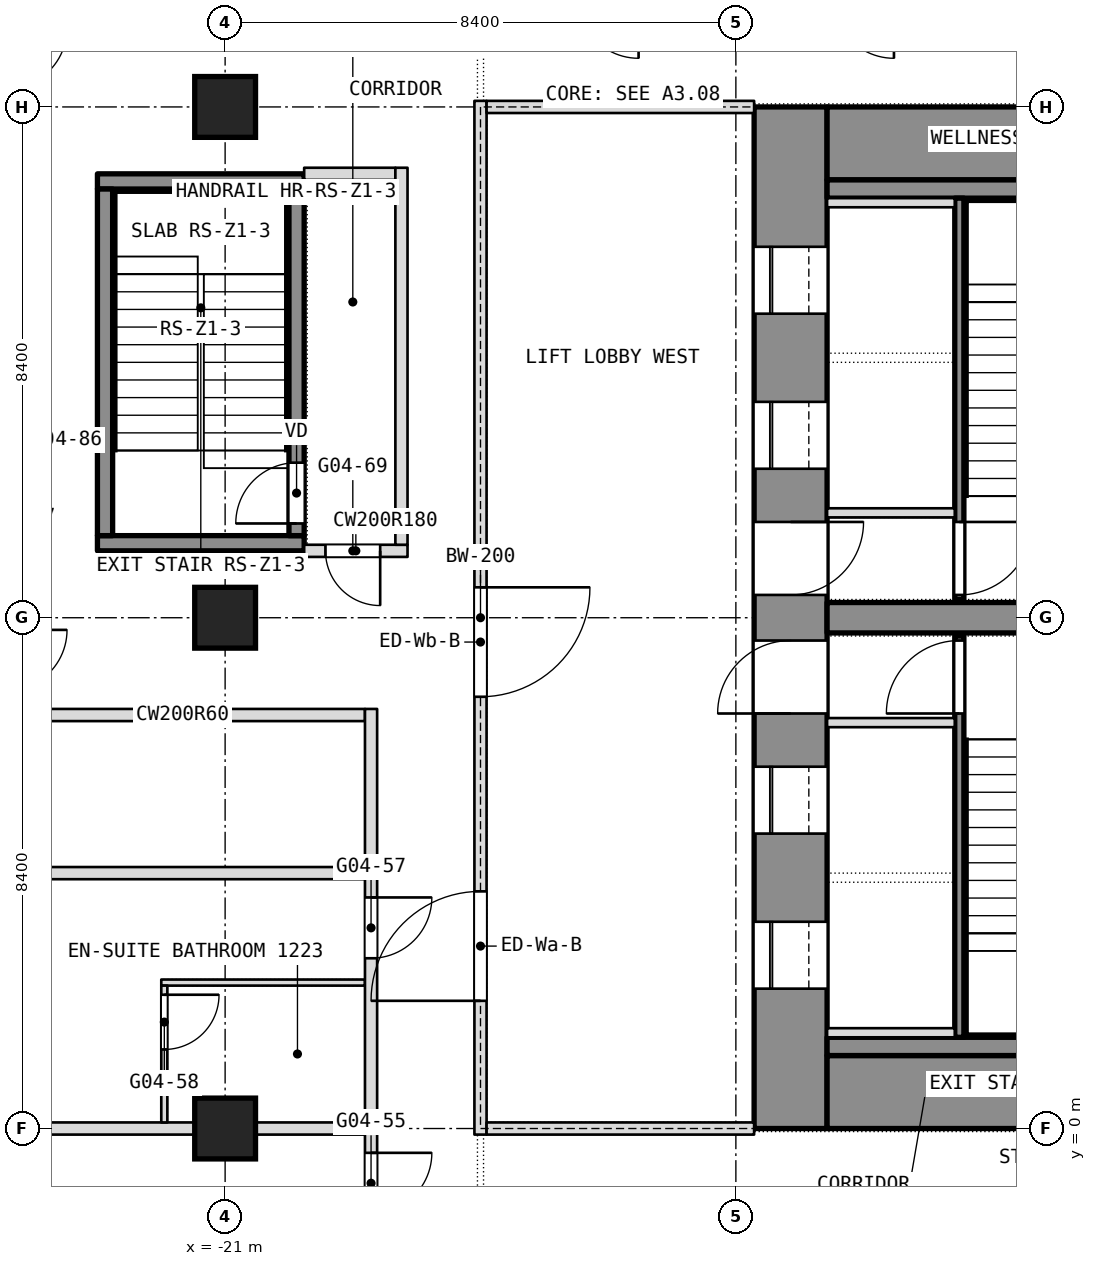
"""IFC4 building model, lengths in metres.
Left out: names, types, materials, properties, quantities, classifications, styles, units other than length and angle.
Written with IfcOpenShell. Run it as: python <this file> out.ifc"""

import sys

from ifc_helpers import new_model, si_unit, direction, frame, frame_2d, origin, origin_2d, place, context, subcontext, project, spatial, rectangle, extrude, element, fill, save


model = new_model("IFC4")
c1 = context("Model", 3, precision=1e-05, world=origin(), true_north=direction((0.0, 1.0)))
c2 = subcontext(c1, "Body", "Model", "MODEL_VIEW")
j1 = project(units=[si_unit("LENGTHUNIT", "METRE"), si_unit("PLANEANGLEUNIT", "RADIAN")], contexts=[c1])
p1 = place(None, origin())
s1 = spatial("IfcSite", under=j1, at=p1, CompositionType="ELEMENT")
p2 = place(p1, origin())
s2 = spatial("IfcBuilding", under=s1, at=p2, CompositionType="ELEMENT")
p3 = place(p2, frame((0.0, 0.0, 58.1)))
s3 = spatial("IfcBuildingStorey", under=s2, at=p3, CompositionType="ELEMENT", Elevation=58.1)
p4 = place(p3, frame((-11.7, 0.0, 0.0), z_axis=(0.0, 0.0, 1.0), x_axis=(0.0, 1.0, 0.0)))
e1 = element("IfcWall", 1, at=p4, inside=s3, PredefinedType="SHEAR", context=c2, shape_type="SweptSolid", body=[
    extrude(rectangle(XDim=16.8, YDim=1.2, at=frame_2d((8.4, 0.0))), origin(), (0.0, 0.0, 1.0), 3.6),
])
p5 = place(p4, frame((2.3, 0.0, 0.0)))
e2 = element("IfcOpeningElement", 2, at=p5, cuts=e1, PredefinedType="OPENING", context=c2, shape_type="SweptSolid", body=[
    extrude(rectangle(XDim=1.1, YDim=2.1, at=frame_2d((0.55, 1.05))), frame((0.0, 0.6, 0.0), z_axis=(0.0, -1.0, 0.0), x_axis=(1.0, 0.0, 0.0)), (0.0, 0.0, 1.0), 1.2),
])
p6 = place(p4, frame((4.85, 0.0, 0.0)))
e3 = element("IfcOpeningElement", 3, at=p6, cuts=e1, PredefinedType="OPENING", context=c2, shape_type="SweptSolid", body=[
    extrude(rectangle(XDim=1.1, YDim=2.1, at=frame_2d((0.55, 1.05))), frame((0.0, 0.6, 0.0), z_axis=(0.0, -1.0, 0.0), x_axis=(1.0, 0.0, 0.0)), (0.0, 0.0, 1.0), 1.2),
])
p7 = place(p4, frame((6.825, 0.0, 0.0)))
e4 = element("IfcOpeningElement", 4, at=p7, cuts=e1, PredefinedType="OPENING", context=c2, shape_type="SweptSolid", body=[
    extrude(rectangle(XDim=1.2, YDim=2.1, at=frame_2d((0.6, 1.05))), frame((0.0, 0.6, 0.0), z_axis=(0.0, -1.0, 0.0), x_axis=(1.0, 0.0, 0.0)), (0.0, 0.0, 1.0), 1.2),
])
p8 = place(p4, frame((13.4, 0.0, 0.0)))
e5 = element("IfcOpeningElement", 5, at=p8, cuts=e1, PredefinedType="OPENING", context=c2, shape_type="SweptSolid", body=[
    extrude(rectangle(XDim=1.1, YDim=2.1, at=frame_2d((0.55, 1.05))), frame((0.0, 0.6, 0.0), z_axis=(0.0, -1.0, 0.0), x_axis=(1.0, 0.0, 0.0)), (0.0, 0.0, 1.0), 1.2),
])
p9 = place(p4, frame((10.85, 0.0, 0.0)))
e6 = element("IfcOpeningElement", 6, at=p9, cuts=e1, PredefinedType="OPENING", context=c2, shape_type="SweptSolid", body=[
    extrude(rectangle(XDim=1.1, YDim=2.1, at=frame_2d((0.55, 1.05))), frame((0.0, 0.6, 0.0), z_axis=(0.0, -1.0, 0.0), x_axis=(1.0, 0.0, 0.0)), (0.0, 0.0, 1.0), 1.2),
])
p10 = place(p4, frame((8.775, 0.0, 0.0)))
e7 = element("IfcOpeningElement", 7, at=p10, cuts=e1, PredefinedType="OPENING", context=c2, shape_type="SweptSolid", body=[
    extrude(rectangle(XDim=1.2, YDim=2.1, at=frame_2d((0.6, 1.05))), frame((0.0, 0.6, 0.0), z_axis=(0.0, -1.0, 0.0), x_axis=(1.0, 0.0, 0.0)), (0.0, 0.0, 1.0), 1.2),
])
for number, where, z_axis, x_axis in (
    (8, (-11.1, 0.6, 0.0), (0.0, 0.0, 1.0), (1.0, 0.0, 0.0)),
    (9, (-11.1, 16.2, 0.0), (0.0, 0.0, 1.0), (1.0, 0.0, 0.0)),
):
    element("IfcWall", number, at=place(p3, frame(where, z_axis=z_axis, x_axis=x_axis)), inside=s3, PredefinedType="SHEAR", context=c2, shape_type="SweptSolid", body=[
        extrude(rectangle(XDim=22.2, YDim=1.2, at=frame_2d((11.1, 0.0))), origin(), (0.0, 0.0, 1.0), 3.6),
    ])
p11 = place(p3, frame((-11.1, 8.4, 0.0), z_axis=(0.0, 0.0, 1.0), x_axis=(1.0, 0.0, 0.0)))
e10 = element("IfcWall", 10, at=p11, inside=s3, PredefinedType="SHEAR", context=c2, shape_type="SweptSolid", body=[
    extrude(rectangle(XDim=6.65, YDim=0.5, at=frame_2d((3.325, 0.0))), origin(), (0.0, 0.0, 1.0), 3.6),
])
for number, where, z_axis, x_axis in (
    (11, (-21.0, 0.0, 0.0), (0.0, 0.0, 1.0), (1.0, 0.0, 0.0)),
    (12, (-21.0, 8.4, 0.0), (0.0, 0.0, 1.0), (1.0, 0.0, 0.0)),
    (13, (-21.0, 16.8, 0.0), (0.0, 0.0, 1.0), (1.0, 0.0, 0.0)),
):
    element("IfcColumn", number, at=place(p3, frame(where, z_axis=z_axis, x_axis=x_axis)), inside=s3, PredefinedType="COLUMN", context=c2, shape_type="SweptSolid", body=[
        extrude(rectangle(XDim=1.0, YDim=1.0, at=origin_2d()), origin(), (0.0, 0.0, 1.0), 3.6),
    ])
p12 = place(p3, frame((-29.7, 0.0, 0.0), z_axis=(0.0, 0.0, 1.0), x_axis=(1.0, 0.0, 0.0)))
e14 = element("IfcWall", 14, at=p12, inside=s3, PredefinedType="PARTITIONING", context=c2, shape_type="SweptSolid", body=[
    extrude(rectangle(XDim=11.0, YDim=0.2, at=frame_2d((5.5, 0.0))), origin(), (0.0, 0.0, 1.0), 2.84),
])
p13 = place(p3, frame((-22.05, 2.4, 0.0), z_axis=(0.0, 0.0, 1.0), x_axis=(1.0, 0.0, 0.0)))
e15 = element("IfcWall", 15, at=p13, inside=s3, PredefinedType="PARTITIONING", context=c2, shape_type="SweptSolid", body=[
    extrude(rectangle(XDim=3.35, YDim=0.1, at=frame_2d((1.675, 0.0))), origin(), (0.0, 0.0, 1.0), 3.34),
])
p14 = place(p3, frame((-29.7, 4.2, 0.0), z_axis=(0.0, 0.0, 1.0), x_axis=(1.0, 0.0, 0.0)))
e16 = element("IfcWall", 16, at=p14, inside=s3, PredefinedType="PARTITIONING", context=c2, shape_type="SweptSolid", body=[
    extrude(rectangle(XDim=11.0, YDim=0.2, at=frame_2d((5.5, 0.0))), origin(), (0.0, 0.0, 1.0), 3.34),
])
p15 = place(p3, frame((-24.7, 6.8, 0.0), z_axis=(0.0, 0.0, 1.0), x_axis=(1.0, 0.0, 0.0)))
e17 = element("IfcWall", 17, at=p15, inside=s3, PredefinedType="PARTITIONING", context=c2, shape_type="SweptSolid", body=[
    extrude(rectangle(XDim=6.0, YDim=0.2, at=frame_2d((3.0, 0.0))), origin(), (0.0, 0.0, 1.0), 3.34),
])
p16 = place(p3, frame((-19.7, 9.5, 0.0), z_axis=(0.0, 0.0, 1.0), x_axis=(1.0, 0.0, 0.0)))
e18 = element("IfcWall", 18, at=p16, inside=s3, PredefinedType="PARTITIONING", context=c2, shape_type="SweptSolid", body=[
    extrude(rectangle(XDim=1.7, YDim=0.2, at=frame_2d((0.85, 0.0))), origin(), (0.0, 0.0, 1.0), 3.34),
])
p17 = place(p16, frame((0.35, 0.0, 0.0)))
e19 = element("IfcOpeningElement", 19, at=p17, cuts=e18, PredefinedType="OPENING", context=c2, shape_type="SweptSolid", body=[
    extrude(rectangle(XDim=0.9, YDim=2.1, at=frame_2d((0.45, 1.05))), frame((0.0, 0.1, 0.0), z_axis=(0.0, -1.0, 0.0), x_axis=(1.0, 0.0, 0.0)), (0.0, 0.0, 1.0), 0.2),
])
p18 = place(p3, frame((-19.7, 15.7, 0.0), z_axis=(0.0, 0.0, 1.0), x_axis=(1.0, 0.0, 0.0)))
e20 = element("IfcWall", 20, at=p18, inside=s3, PredefinedType="PARTITIONING", context=c2, shape_type="SweptSolid", body=[
    extrude(rectangle(XDim=1.5, YDim=0.2, at=frame_2d((0.75, 0.0))), origin(), (0.0, 0.0, 1.0), 3.34),
])
p19 = place(p3, frame((-18.1, 9.6, 0.0), z_axis=(0.0, 0.0, 1.0), x_axis=(0.0, 1.0, 0.0)))
e21 = element("IfcWall", 21, at=p19, inside=s3, PredefinedType="PARTITIONING", context=c2, shape_type="SweptSolid", body=[
    extrude(rectangle(XDim=6.2, YDim=0.2, at=frame_2d((3.1, 0.0))), origin(), (0.0, 0.0, 1.0), 3.34),
])
p20 = place(p3, frame((-18.6, -16.665, 0.0), z_axis=(0.0, 0.0, 1.0), x_axis=(0.0, 1.0, 0.0)))
e22 = element("IfcWall", 22, at=p20, inside=s3, PredefinedType="PARTITIONING", context=c2, shape_type="SweptSolid", body=[
    extrude(rectangle(XDim=23.565, YDim=0.2, at=frame_2d((11.782, 0.0))), origin(), (0.0, 0.0, 1.0), 3.34),
])
p21 = place(p20, frame((5.724, 0.0, 0.0)))
e23 = element("IfcOpeningElement", 23, at=p21, cuts=e22, PredefinedType="OPENING", context=c2, shape_type="SweptSolid", body=[
    extrude(rectangle(XDim=1.1, YDim=2.1, at=frame_2d((0.55, 1.05))), frame((0.0, 0.1, 0.0), z_axis=(0.0, -1.0, 0.0), x_axis=(1.0, 0.0, 0.0)), (0.0, 0.0, 1.0), 0.2),
])
p22 = place(p20, frame((8.665, 0.0, 0.0)))
e24 = element("IfcOpeningElement", 24, at=p22, cuts=e22, PredefinedType="OPENING", context=c2, shape_type="SweptSolid", body=[
    extrude(rectangle(XDim=1.0, YDim=2.1, at=frame_2d((0.5, 1.05))), frame((0.0, 0.1, 0.0), z_axis=(0.0, -1.0, 0.0), x_axis=(1.0, 0.0, 0.0)), (0.0, 0.0, 1.0), 0.2),
])
p23 = place(p20, frame((15.265, 0.0, 0.0)))
e25 = element("IfcOpeningElement", 25, at=p23, cuts=e22, PredefinedType="OPENING", context=c2, shape_type="SweptSolid", body=[
    extrude(rectangle(XDim=1.0, YDim=2.1, at=frame_2d((0.5, 1.05))), frame((0.0, 0.1, 0.0), z_axis=(0.0, -1.0, 0.0), x_axis=(1.0, 0.0, 0.0)), (0.0, 0.0, 1.0), 0.2),
])
p24 = place(p20, frame((19.465, 0.0, 0.0)))
e26 = element("IfcOpeningElement", 26, at=p24, cuts=e22, PredefinedType="OPENING", context=c2, shape_type="SweptSolid", body=[
    extrude(rectangle(XDim=1.0, YDim=2.1, at=frame_2d((0.5, 1.05))), frame((0.0, 0.1, 0.0), z_axis=(0.0, -1.0, 0.0), x_axis=(1.0, 0.0, 0.0)), (0.0, 0.0, 1.0), 0.2),
])
p25 = place(p3, frame((-22.0, 0.1, 0.0), z_axis=(0.0, 0.0, 1.0), x_axis=(0.0, 1.0, 0.0)))
e27 = element("IfcWall", 27, at=p25, inside=s3, PredefinedType="PARTITIONING", context=c2, shape_type="SweptSolid", body=[
    extrude(rectangle(XDim=2.25, YDim=0.1, at=frame_2d((1.125, 0.0))), origin(), (0.0, 0.0, 1.0), 3.34),
])
p26 = place(p25, frame((1.2, 0.0, 0.0)))
e28 = element("IfcOpeningElement", 28, at=p26, cuts=e27, PredefinedType="OPENING", context=c2, shape_type="SweptSolid", body=[
    extrude(rectangle(XDim=0.9, YDim=2.1, at=frame_2d((0.45, 1.05))), frame((0.0, 0.05, 0.0), z_axis=(0.0, -1.0, 0.0), x_axis=(1.0, 0.0, 0.0)), (0.0, 0.0, 1.0), 0.1),
])
for number, where, z_axis, x_axis in (
    (29, (-11.1, 1.35, 0.0), (0.0, 0.0, 1.0), (1.0, 0.0, 0.0)),
    (30, (-11.1, 15.45, 0.0), (0.0, 0.0, 1.0), (1.0, 0.0, 0.0)),
):
    element("IfcWall", number, at=place(p3, frame(where, z_axis=z_axis, x_axis=x_axis)), inside=s3, PredefinedType="PARTITIONING", context=c2, shape_type="SweptSolid", body=[
        extrude(rectangle(XDim=22.2, YDim=0.3, at=frame_2d((11.1, 0.0))), origin(), (0.0, 0.0, 1.0), 3.34),
    ])
p27 = place(p3, frame((-8.925, 1.5, 0.0), z_axis=(0.0, 0.0, 1.0), x_axis=(0.0, 1.0, 0.0)))
e31 = element("IfcWall", 31, at=p27, inside=s3, PredefinedType="SHEAR", context=c2, shape_type="SweptSolid", body=[
    extrude(rectangle(XDim=6.6, YDim=0.15, at=frame_2d((3.3, 0.0))), origin(), (0.0, 0.0, 1.0), 3.34),
])
p28 = place(p27, frame((5.325, 0.0, 0.0)))
e32 = element("IfcOpeningElement", 32, at=p28, cuts=e31, PredefinedType="OPENING", context=c2, shape_type="SweptSolid", body=[
    extrude(rectangle(XDim=1.2, YDim=2.1, at=frame_2d((0.6, 1.05))), frame((0.0, 0.075, 0.0), z_axis=(0.0, -1.0, 0.0), x_axis=(1.0, 0.0, 0.0)), (0.0, 0.0, 1.0), 0.15),
])
for number, where, z_axis, x_axis in (
    (33, (-11.1, 6.675, 0.0), (0.0, 0.0, 1.0), (1.0, 0.0, 0.0)),
    (34, (-11.1, 1.575, 0.0), (0.0, 0.0, 1.0), (1.0, 0.0, 0.0)),
):
    element("IfcWall", number, at=place(p3, frame(where, z_axis=z_axis, x_axis=x_axis)), inside=s3, PredefinedType="SHEAR", context=c2, shape_type="SweptSolid", body=[
        extrude(rectangle(XDim=2.1, YDim=0.15, at=frame_2d((1.05, 0.0))), origin(), (0.0, 0.0, 1.0), 3.6),
    ])
p29 = place(p3, frame((-8.925, 8.7, 0.0), z_axis=(0.0, 0.0, 1.0), x_axis=(0.0, 1.0, 0.0)))
e35 = element("IfcWall", 35, at=p29, inside=s3, PredefinedType="SHEAR", context=c2, shape_type="SweptSolid", body=[
    extrude(rectangle(XDim=6.6, YDim=0.15, at=frame_2d((3.3, 0.0))), origin(), (0.0, 0.0, 1.0), 3.34),
])
p30 = place(p29, frame((0.075, 0.0, 0.0)))
e36 = element("IfcOpeningElement", 36, at=p30, cuts=e35, PredefinedType="OPENING", context=c2, shape_type="SweptSolid", body=[
    extrude(rectangle(XDim=1.2, YDim=2.1, at=frame_2d((0.6, 1.05))), frame((0.0, 0.075, 0.0), z_axis=(0.0, -1.0, 0.0), x_axis=(1.0, 0.0, 0.0)), (0.0, 0.0, 1.0), 0.15),
])
for number, where, z_axis, x_axis in (
    (37, (-11.1, 10.125, 0.0), (0.0, 0.0, 1.0), (1.0, 0.0, 0.0)),
    (38, (-11.1, 15.225, 0.0), (0.0, 0.0, 1.0), (1.0, 0.0, 0.0)),
):
    element("IfcWall", number, at=place(p3, frame(where, z_axis=z_axis, x_axis=x_axis)), inside=s3, PredefinedType="SHEAR", context=c2, shape_type="SweptSolid", body=[
        extrude(rectangle(XDim=2.1, YDim=0.15, at=frame_2d((1.05, 0.0))), origin(), (0.0, 0.0, 1.0), 3.6),
    ])
p31 = place(p3, frame((-16.8, -0.1, 0.0), z_axis=(0.0, 0.0, 1.0), x_axis=(0.0, 1.0, 0.0)))
e39 = element("IfcWall", 39, at=p31, inside=s3, PredefinedType="PARTITIONING", context=c2, shape_type="SweptSolid", body=[
    extrude(rectangle(XDim=17.0, YDim=0.2, at=frame_2d((8.5, 0.0))), origin(), (0.0, 0.0, 1.0), 3.34),
])
p32 = place(p31, frame((2.2, 0.0, 0.0)))
e40 = element("IfcOpeningElement", 40, at=p32, cuts=e39, PredefinedType="OPENING", context=c2, shape_type="SweptSolid", body=[
    extrude(rectangle(XDim=1.8, YDim=2.1, at=frame_2d((0.9, 1.05))), frame((0.0, 0.1, 0.0), z_axis=(0.0, -1.0, 0.0), x_axis=(1.0, 0.0, 0.0)), (0.0, 0.0, 1.0), 0.2),
])
p33 = place(p31, frame((7.2, 0.0, 0.0)))
e41 = element("IfcOpeningElement", 41, at=p33, cuts=e39, PredefinedType="OPENING", context=c2, shape_type="SweptSolid", body=[
    extrude(rectangle(XDim=1.8, YDim=2.1, at=frame_2d((0.9, 1.05))), frame((0.0, 0.1, 0.0), z_axis=(0.0, -1.0, 0.0), x_axis=(1.0, 0.0, 0.0)), (0.0, 0.0, 1.0), 0.2),
])
for number, where, z_axis, x_axis in (
    (42, (-16.7, 0.0, 0.0), (0.0, 0.0, 1.0), (1.0, 0.0, 0.0)),
    (43, (-16.7, 16.8, 0.0), (0.0, 0.0, 1.0), (1.0, 0.0, 0.0)),
):
    element("IfcWall", number, at=place(p3, frame(where, z_axis=z_axis, x_axis=x_axis)), inside=s3, PredefinedType="PARTITIONING", context=c2, shape_type="SweptSolid", body=[
        extrude(rectangle(XDim=4.4, YDim=0.2, at=frame_2d((2.2, 0.0))), origin(), (0.0, 0.0, 1.0), 2.84),
    ])
for number, where, z_axis, x_axis in (
    (44, (-23.1, 9.625, 0.1), (0.0, 0.0, 1.0), (1.0, 0.0, 0.0)),
    (45, (-23.1, 15.575, 0.1), (0.0, 0.0, 1.0), (1.0, 0.0, 0.0)),
):
    element("IfcWall", number, at=place(p3, frame(where, z_axis=z_axis, x_axis=x_axis)), inside=s3, PredefinedType="SHEAR", context=c2, shape_type="SweptSolid", body=[
        extrude(rectangle(XDim=3.4, YDim=0.25, at=frame_2d((1.7, 0.0))), origin(), (0.0, 0.0, 1.0), 3.6),
    ])
p34 = place(p3, frame((-22.975, 9.75, 0.1), z_axis=(0.0, 0.0, 1.0), x_axis=(0.0, 1.0, 0.0)))
e46 = element("IfcWall", 46, at=p34, inside=s3, PredefinedType="SHEAR", context=c2, shape_type="SweptSolid", body=[
    extrude(rectangle(XDim=5.7, YDim=0.25, at=frame_2d((2.85, 0.0))), origin(), (0.0, 0.0, 1.0), 3.6),
])
p35 = place(p3, frame((-19.825, 9.75, 0.1), z_axis=(0.0, 0.0, 1.0), x_axis=(0.0, 1.0, 0.0)))
e47 = element("IfcWall", 47, at=p35, inside=s3, PredefinedType="SHEAR", context=c2, shape_type="SweptSolid", body=[
    extrude(rectangle(XDim=5.7, YDim=0.25, at=frame_2d((2.85, 0.0))), origin(), (0.0, 0.0, 1.0), 3.6),
])
p36 = place(p35, frame((0.2, 0.0, 0.0)))
e48 = element("IfcOpeningElement", 48, at=p36, cuts=e47, PredefinedType="OPENING", context=c2, shape_type="SweptSolid", body=[
    extrude(rectangle(XDim=1.0, YDim=2.1, at=frame_2d((0.5, 1.05))), frame((0.0, 0.125, 0.0), z_axis=(0.0, -1.0, 0.0), x_axis=(1.0, 0.0, 0.0)), (0.0, 0.0, 1.0), 0.25),
])
p37 = place(p17, origin())
e49 = element("IfcDoor", 49, at=p37, inside=s3, OperationType="SINGLE_SWING_RIGHT", PredefinedType="DOOR", context=c2, shape_type="SweptSolid", body=[
    extrude(rectangle(XDim=0.9, YDim=2.1, at=frame_2d((0.45, 1.05))), frame((0.0, 0.025, 0.0), z_axis=(0.0, -1.0, 0.0), x_axis=(1.0, 0.0, 0.0)), (0.0, 0.0, 1.0), 0.05),
])
fill(e19, e49)
p38 = place(p23, origin())
e50 = element("IfcDoor", 50, at=p38, inside=s3, OperationType="SINGLE_SWING_RIGHT", PredefinedType="DOOR", context=c2, shape_type="SweptSolid", body=[
    extrude(rectangle(XDim=1.0, YDim=2.1, at=frame_2d((0.5, 1.05))), frame((0.0, 0.025, 0.0), z_axis=(0.0, -1.0, 0.0), x_axis=(1.0, 0.0, 0.0)), (0.0, 0.0, 1.0), 0.05),
])
fill(e25, e50)
p39 = place(p24, origin())
e51 = element("IfcDoor", 51, at=p39, inside=s3, OperationType="SINGLE_SWING_RIGHT", PredefinedType="DOOR", context=c2, shape_type="SweptSolid", body=[
    extrude(rectangle(XDim=1.0, YDim=2.1, at=frame_2d((0.5, 1.05))), frame((0.0, 0.025, 0.0), z_axis=(0.0, -1.0, 0.0), x_axis=(1.0, 0.0, 0.0)), (0.0, 0.0, 1.0), 0.05),
])
fill(e26, e51)
p40 = place(p26, origin())
e52 = element("IfcDoor", 52, at=p40, inside=s3, OperationType="SINGLE_SWING_LEFT", PredefinedType="DOOR", context=c2, shape_type="SweptSolid", body=[
    extrude(rectangle(XDim=0.9, YDim=2.1, at=frame_2d((0.45, 1.05))), frame((0.0, 0.025, 0.0), z_axis=(0.0, -1.0, 0.0), x_axis=(1.0, 0.0, 0.0)), (0.0, 0.0, 1.0), 0.05),
])
fill(e28, e52)
p41 = place(p36, origin())
e53 = element("IfcDoor", 53, at=p41, inside=s3, OperationType="SINGLE_SWING_LEFT", PredefinedType="DOOR", context=c2, shape_type="SweptSolid", body=[
    extrude(rectangle(XDim=1.0, YDim=2.1, at=frame_2d((0.5, 1.05))), frame((0.0, 0.025, 0.0), z_axis=(0.0, -1.0, 0.0), x_axis=(1.0, 0.0, 0.0)), (0.0, 0.0, 1.0), 0.05),
])
fill(e48, e53)
p42 = place(p5, origin())
e54 = element("IfcDoor", 54, at=p42, inside=s3, OperationType="SLIDING_TO_LEFT", PredefinedType="DOOR", context=c2, shape_type="SweptSolid", body=[
    extrude(rectangle(XDim=1.1, YDim=2.1, at=frame_2d((0.55, 1.05))), frame((0.0, 0.025, 0.0), z_axis=(0.0, -1.0, 0.0), x_axis=(1.0, 0.0, 0.0)), (0.0, 0.0, 1.0), 0.05),
])
fill(e2, e54)
p43 = place(p6, origin())
e55 = element("IfcDoor", 55, at=p43, inside=s3, OperationType="SLIDING_TO_LEFT", PredefinedType="DOOR", context=c2, shape_type="SweptSolid", body=[
    extrude(rectangle(XDim=1.1, YDim=2.1, at=frame_2d((0.55, 1.05))), frame((0.0, 0.025, 0.0), z_axis=(0.0, -1.0, 0.0), x_axis=(1.0, 0.0, 0.0)), (0.0, 0.0, 1.0), 0.05),
])
fill(e3, e55)
p44 = place(p7, origin())
e56 = element("IfcDoor", 56, at=p44, inside=s3, OperationType="SINGLE_SWING_LEFT", PredefinedType="DOOR", context=c2, shape_type="SweptSolid", body=[
    extrude(rectangle(XDim=1.2, YDim=2.1, at=frame_2d((0.6, 1.05))), frame((0.0, 0.025, 0.0), z_axis=(0.0, -1.0, 0.0), x_axis=(1.0, 0.0, 0.0)), (0.0, 0.0, 1.0), 0.05),
])
fill(e4, e56)
p45 = place(p28, origin())
e57 = element("IfcDoor", 57, at=p45, inside=s3, OperationType="SINGLE_SWING_LEFT", PredefinedType="DOOR", context=c2, shape_type="SweptSolid", body=[
    extrude(rectangle(XDim=1.2, YDim=2.1, at=frame_2d((0.6, 1.05))), frame((0.0, 0.025, 0.0), z_axis=(0.0, -1.0, 0.0), x_axis=(1.0, 0.0, 0.0)), (0.0, 0.0, 1.0), 0.05),
])
fill(e32, e57)
p46 = place(p8, origin())
e58 = element("IfcDoor", 58, at=p46, inside=s3, OperationType="SLIDING_TO_LEFT", PredefinedType="DOOR", context=c2, shape_type="SweptSolid", body=[
    extrude(rectangle(XDim=1.1, YDim=2.1, at=frame_2d((0.55, 1.05))), frame((0.0, 0.025, 0.0), z_axis=(0.0, -1.0, 0.0), x_axis=(1.0, 0.0, 0.0)), (0.0, 0.0, 1.0), 0.05),
])
fill(e5, e58)
p47 = place(p9, origin())
e59 = element("IfcDoor", 59, at=p47, inside=s3, OperationType="SLIDING_TO_LEFT", PredefinedType="DOOR", context=c2, shape_type="SweptSolid", body=[
    extrude(rectangle(XDim=1.1, YDim=2.1, at=frame_2d((0.55, 1.05))), frame((0.0, 0.025, 0.0), z_axis=(0.0, -1.0, 0.0), x_axis=(1.0, 0.0, 0.0)), (0.0, 0.0, 1.0), 0.05),
])
fill(e6, e59)
p48 = place(p10, origin())
e60 = element("IfcDoor", 60, at=p48, inside=s3, OperationType="SINGLE_SWING_LEFT", PredefinedType="DOOR", context=c2, shape_type="SweptSolid", body=[
    extrude(rectangle(XDim=1.2, YDim=2.1, at=frame_2d((0.6, 1.05))), frame((0.0, 0.025, 0.0), z_axis=(0.0, -1.0, 0.0), x_axis=(1.0, 0.0, 0.0)), (0.0, 0.0, 1.0), 0.05),
])
fill(e7, e60)
p49 = place(p30, origin())
e61 = element("IfcDoor", 61, at=p49, inside=s3, OperationType="SINGLE_SWING_LEFT", PredefinedType="DOOR", context=c2, shape_type="SweptSolid", body=[
    extrude(rectangle(XDim=1.2, YDim=2.1, at=frame_2d((0.6, 1.05))), frame((0.0, 0.025, 0.0), z_axis=(0.0, -1.0, 0.0), x_axis=(1.0, 0.0, 0.0)), (0.0, 0.0, 1.0), 0.05),
])
fill(e36, e61)
p50 = place(p32, origin())
e62 = element("IfcDoor", 62, at=p50, inside=s3, OperationType="DOUBLE_DOOR_SINGLE_SWING", PredefinedType="DOOR", context=c2, shape_type="SweptSolid", body=[
    extrude(rectangle(XDim=1.8, YDim=2.1, at=frame_2d((0.9, 1.05))), frame((0.0, 0.025, 0.0), z_axis=(0.0, -1.0, 0.0), x_axis=(1.0, 0.0, 0.0)), (0.0, 0.0, 1.0), 0.05),
])
fill(e40, e62)
p51 = place(p33, origin())
e63 = element("IfcDoor", 63, at=p51, inside=s3, OperationType="DOUBLE_DOOR_SINGLE_SWING", PredefinedType="DOOR", context=c2, shape_type="SweptSolid", body=[
    extrude(rectangle(XDim=1.8, YDim=2.1, at=frame_2d((0.9, 1.05))), frame((0.0, 0.025, 0.0), z_axis=(0.0, -1.0, 0.0), x_axis=(1.0, 0.0, 0.0)), (0.0, 0.0, 1.0), 0.05),
])
fill(e41, e63)
save(model, sys.argv[1])
